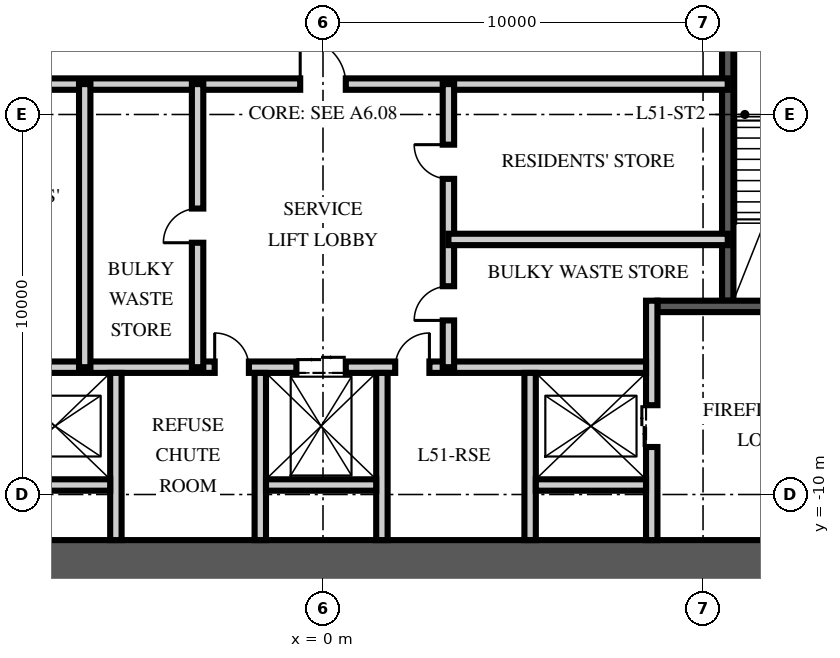
"""IFC4 building model, lengths in metres.
Left out: names, types, materials, properties, quantities, classifications, styles, units other than length and angle.
Written with IfcOpenShell. Run it as: python <this file> out.ifc"""

import sys

from ifc_helpers import new_model, si_unit, direction, frame, frame_2d, origin, place, context, subcontext, project, spatial, rectangle, extrude, element, fill, save


model = new_model("IFC4")
c1 = context("Model", 3, precision=1e-05, world=origin(), true_north=direction((0.0, 1.0)))
c2 = subcontext(c1, "Body", "Model", "MODEL_VIEW")
j1 = project(units=[si_unit("LENGTHUNIT", "METRE"), si_unit("PLANEANGLEUNIT", "RADIAN")], contexts=[c1])
p1 = place(None, origin())
s1 = spatial("IfcSite", under=j1, at=p1, CompositionType="ELEMENT")
p2 = place(p1, origin())
s2 = spatial("IfcBuilding", under=s1, at=p2, CompositionType="ELEMENT")
p3 = place(p2, frame((0.0, 0.0, 207.0)))
s3 = spatial("IfcBuildingStorey", under=s2, at=p3, CompositionType="ELEMENT", Elevation=207.0)
p4 = place(p3, frame((-15.5, -12.0, -0.25), z_axis=(0.0, 0.0, 1.0), x_axis=(1.0, 0.0, 0.0)))
e1 = element("IfcWall", 1, at=p4, inside=s3, PredefinedType="SHEAR", context=c2, shape_type="SweptSolid", body=[
    extrude(rectangle(XDim=31.0, YDim=1.6, at=frame_2d((15.5, 0.0))), origin(), (0.0, 0.0, 1.0), 3.75),
])
p5 = place(p3, frame((10.65, -4.9, 0.0), z_axis=(0.0, 0.0, 1.0), x_axis=(0.0, 1.0, 0.0)))
e2 = element("IfcWall", 2, at=p5, inside=s3, PredefinedType="SOLIDWALL", context=c2, shape_type="SweptSolid", body=[
    extrude(rectangle(XDim=10.1, YDim=0.3, at=frame_2d((5.05, 0.0))), origin(), (0.0, 0.0, 1.0), 3.5),
])
p6 = place(p3, frame((14.7, -5.05, 0.0), z_axis=(0.0, 0.0, 1.0), x_axis=(-1.0, 0.0, 0.0)))
e3 = element("IfcWall", 3, at=p6, inside=s3, PredefinedType="SOLIDWALL", context=c2, shape_type="SweptSolid", body=[
    extrude(rectangle(XDim=5.9, YDim=0.3, at=frame_2d((2.95, 0.0))), origin(), (0.0, 0.0, 1.0), 3.5),
])
p7 = place(p6, frame((1.35, 0.0, 0.0)))
e4 = element("IfcOpeningElement", 4, at=p7, cuts=e3, PredefinedType="OPENING", context=c2, shape_type="SweptSolid", body=[
    extrude(rectangle(XDim=1.2, YDim=2.1, at=frame_2d((0.6, 1.05))), frame((0.0, 0.16, 0.0), z_axis=(0.0, -1.0, 0.0), x_axis=(1.0, 0.0, 0.0)), (0.0, 0.0, 1.0), 0.32),
])
p8 = place(p3, frame((8.65, -11.2, 0.0), z_axis=(0.0, 0.0, 1.0), x_axis=(0.0, 1.0, 0.0)))
e5 = element("IfcWall", 5, at=p8, inside=s3, PredefinedType="PARTITIONING", context=c2, shape_type="SweptSolid", body=[
    extrude(rectangle(XDim=6.3, YDim=0.3, at=frame_2d((3.15, 0.0))), origin(), (0.0, 0.0, 1.0), 3.5),
])
p9 = place(p8, frame((2.45, 0.0, 0.0)))
e6 = element("IfcOpeningElement", 6, at=p9, cuts=e5, PredefinedType="OPENING", context=c2, shape_type="SweptSolid", body=[
    extrude(rectangle(XDim=1.1, YDim=2.1, at=frame_2d((0.55, 1.05))), frame((0.0, 0.16, 0.0), z_axis=(0.0, -1.0, 0.0), x_axis=(1.0, 0.0, 0.0)), (0.0, 0.0, 1.0), 0.32),
])
p10 = place(p3, frame((-8.5, -6.65, 0.0), z_axis=(0.0, 0.0, 1.0), x_axis=(1.0, 0.0, 0.0)))
e7 = element("IfcWall", 7, at=p10, inside=s3, PredefinedType="PARTITIONING", context=c2, shape_type="SweptSolid", body=[
    extrude(rectangle(XDim=17.0, YDim=0.3, at=frame_2d((8.5, 0.0))), origin(), (0.0, 0.0, 1.0), 3.5),
])
p11 = place(p10, frame((7.8, 0.0, 0.0)))
e8 = element("IfcOpeningElement", 8, at=p11, cuts=e7, PredefinedType="OPENING", context=c2, shape_type="SweptSolid", body=[
    extrude(rectangle(XDim=1.3, YDim=2.4, at=frame_2d((0.65, 1.2))), frame((0.0, 0.16, 0.0), z_axis=(0.0, -1.0, 0.0), x_axis=(1.0, 0.0, 0.0)), (0.0, 0.0, 1.0), 0.32),
])
p12 = place(p10, frame((5.65, 0.0, 0.0)))
e9 = element("IfcOpeningElement", 9, at=p12, cuts=e7, PredefinedType="OPENING", context=c2, shape_type="SweptSolid", body=[
    extrude(rectangle(XDim=0.9, YDim=2.1, at=frame_2d((0.45, 1.05))), frame((0.0, 0.16, 0.0), z_axis=(0.0, -1.0, 0.0), x_axis=(1.0, 0.0, 0.0)), (0.0, 0.0, 1.0), 0.32),
])
p13 = place(p10, frame((10.4, 0.0, 0.0)))
e10 = element("IfcOpeningElement", 10, at=p13, cuts=e7, PredefinedType="OPENING", context=c2, shape_type="SweptSolid", body=[
    extrude(rectangle(XDim=0.9, YDim=2.1, at=frame_2d((0.45, 1.05))), frame((0.0, 0.16, 0.0), z_axis=(0.0, -1.0, 0.0), x_axis=(1.0, 0.0, 0.0)), (0.0, 0.0, 1.0), 0.32),
])
for number, where, z_axis, x_axis in (
    (11, (-5.45, -11.2, 0.0), (0.0, 0.0, 1.0), (0.0, 1.0, 0.0)),
    (12, (-1.65, -11.2, 0.0), (0.0, 0.0, 1.0), (0.0, 1.0, 0.0)),
    (13, (1.55, -11.2, 0.0), (0.0, 0.0, 1.0), (0.0, 1.0, 0.0)),
    (14, (5.45, -11.2, 0.0), (0.0, 0.0, 1.0), (0.0, 1.0, 0.0)),
):
    element("IfcWall", number, at=place(p3, frame(where, z_axis=z_axis, x_axis=x_axis)), inside=s3, PredefinedType="PARTITIONING", context=c2, shape_type="SweptSolid", body=[
        extrude(rectangle(XDim=4.4, YDim=0.3, at=frame_2d((2.2, 0.0))), origin(), (0.0, 0.0, 1.0), 3.5),
    ])
for number, where, z_axis, x_axis in (
    (15, (-8.5, -9.75, 0.0), (0.0, 0.0, 1.0), (1.0, 0.0, 0.0)),
    (16, (-1.5, -9.75, 0.0), (0.0, 0.0, 1.0), (1.0, 0.0, 0.0)),
    (17, (5.6, -9.75, 0.0), (0.0, 0.0, 1.0), (1.0, 0.0, 0.0)),
):
    element("IfcWall", number, at=place(p3, frame(where, z_axis=z_axis, x_axis=x_axis)), inside=s3, PredefinedType="PARTITIONING", context=c2, shape_type="SweptSolid", body=[
        extrude(rectangle(XDim=2.9, YDim=0.3, at=frame_2d((1.45, 0.0))), origin(), (0.0, 0.0, 1.0), 3.5),
    ])
p14 = place(p3, frame((-10.65, 0.8, 0.0), z_axis=(0.0, 0.0, 1.0), x_axis=(1.0, 0.0, 0.0)))
e18 = element("IfcWall", 18, at=p14, inside=s3, PredefinedType="PARTITIONING", context=c2, shape_type="SweptSolid", body=[
    extrude(rectangle(XDim=21.3, YDim=0.3, at=frame_2d((10.65, 0.0))), origin(), (0.0, 0.0, 1.0), 3.5),
])
p15 = place(p14, frame((10.05, 0.0, 0.0)))
e19 = element("IfcOpeningElement", 19, at=p15, cuts=e18, PredefinedType="OPENING", context=c2, shape_type="SweptSolid", body=[
    extrude(rectangle(XDim=1.2, YDim=2.1, at=frame_2d((0.6, 1.05))), frame((0.0, 0.16, 0.0), z_axis=(0.0, -1.0, 0.0), x_axis=(1.0, 0.0, 0.0)), (0.0, 0.0, 1.0), 0.32),
])
p16 = place(p14, frame((1.74, 0.0, 0.0)))
e20 = element("IfcOpeningElement", 20, at=p16, cuts=e18, PredefinedType="OPENING", context=c2, shape_type="SweptSolid", body=[
    extrude(rectangle(XDim=0.9, YDim=2.1, at=frame_2d((0.45, 1.05))), frame((0.0, 0.16, 0.0), z_axis=(0.0, -1.0, 0.0), x_axis=(1.0, 0.0, 0.0)), (0.0, 0.0, 1.0), 0.32),
])
p17 = place(p3, frame((-3.3, -6.65, 0.0), z_axis=(0.0, 0.0, 1.0), x_axis=(0.0, 1.0, 0.0)))
e21 = element("IfcWall", 21, at=p17, inside=s3, PredefinedType="PARTITIONING", context=c2, shape_type="SweptSolid", body=[
    extrude(rectangle(XDim=7.45, YDim=0.3, at=frame_2d((3.725, 0.0))), origin(), (0.0, 0.0, 1.0), 3.5),
])
p18 = place(p17, frame((3.275, 0.0, 0.0)))
e22 = element("IfcOpeningElement", 22, at=p18, cuts=e21, PredefinedType="OPENING", context=c2, shape_type="SweptSolid", body=[
    extrude(rectangle(XDim=0.9, YDim=2.1, at=frame_2d((0.45, 1.05))), frame((0.0, 0.16, 0.0), z_axis=(0.0, -1.0, 0.0), x_axis=(1.0, 0.0, 0.0)), (0.0, 0.0, 1.0), 0.32),
])
p19 = place(p3, frame((3.3, -6.65, 0.0), z_axis=(0.0, 0.0, 1.0), x_axis=(0.0, 1.0, 0.0)))
e23 = element("IfcWall", 23, at=p19, inside=s3, PredefinedType="PARTITIONING", context=c2, shape_type="SweptSolid", body=[
    extrude(rectangle(XDim=7.45, YDim=0.3, at=frame_2d((3.725, 0.0))), origin(), (0.0, 0.0, 1.0), 3.5),
])
p20 = place(p19, frame((1.231, 0.0, 0.0)))
e24 = element("IfcOpeningElement", 24, at=p20, cuts=e23, PredefinedType="OPENING", context=c2, shape_type="SweptSolid", body=[
    extrude(rectangle(XDim=0.9, YDim=2.1, at=frame_2d((0.45, 1.05))), frame((0.0, 0.16, 0.0), z_axis=(0.0, -1.0, 0.0), x_axis=(1.0, 0.0, 0.0)), (0.0, 0.0, 1.0), 0.32),
])
p21 = place(p19, frame((4.956, 0.0, 0.0)))
e25 = element("IfcOpeningElement", 25, at=p21, cuts=e23, PredefinedType="OPENING", context=c2, shape_type="SweptSolid", body=[
    extrude(rectangle(XDim=0.9, YDim=2.1, at=frame_2d((0.45, 1.05))), frame((0.0, 0.16, 0.0), z_axis=(0.0, -1.0, 0.0), x_axis=(1.0, 0.0, 0.0)), (0.0, 0.0, 1.0), 0.32),
])
p22 = place(p3, frame((-6.27, -6.65, 0.0), z_axis=(0.0, 0.0, 1.0), x_axis=(0.0, 1.0, 0.0)))
e26 = element("IfcWall", 26, at=p22, inside=s3, PredefinedType="PARTITIONING", context=c2, shape_type="SweptSolid", body=[
    extrude(rectangle(XDim=7.45, YDim=0.3, at=frame_2d((3.725, 0.0))), origin(), (0.0, 0.0, 1.0), 3.5),
])
p23 = place(p3, frame((10.65, -3.288, 0.0), z_axis=(0.0, 0.0, 1.0), x_axis=(-1.0, 0.0, 0.0)))
e27 = element("IfcWall", 27, at=p23, inside=s3, PredefinedType="PARTITIONING", context=c2, shape_type="SweptSolid", body=[
    extrude(rectangle(XDim=7.35, YDim=0.3, at=frame_2d((3.675, 0.0))), origin(), (0.0, 0.0, 1.0), 3.5),
])
p24 = place(p9, origin())
e28 = element("IfcDoor", 28, at=p24, inside=s3, OperationType="DOUBLE_DOOR_SLIDING", PredefinedType="DOOR", context=c2, shape_type="SweptSolid", body=[
    extrude(rectangle(XDim=1.1, YDim=2.1, at=frame_2d((0.55, 1.05))), frame((0.0, 0.025, 0.0), z_axis=(0.0, -1.0, 0.0), x_axis=(1.0, 0.0, 0.0)), (0.0, 0.0, 1.0), 0.05),
])
fill(e6, e28)
p25 = place(p11, origin())
e29 = element("IfcDoor", 29, at=p25, inside=s3, OperationType="DOUBLE_DOOR_SLIDING", PredefinedType="DOOR", context=c2, shape_type="SweptSolid", body=[
    extrude(rectangle(XDim=1.3, YDim=2.4, at=frame_2d((0.65, 1.2))), frame((0.0, 0.025, 0.0), z_axis=(0.0, -1.0, 0.0), x_axis=(1.0, 0.0, 0.0)), (0.0, 0.0, 1.0), 0.05),
])
fill(e8, e29)
p26 = place(p15, origin())
e30 = element("IfcDoor", 30, at=p26, inside=s3, OperationType="SINGLE_SWING_LEFT", PredefinedType="DOOR", context=c2, shape_type="SweptSolid", body=[
    extrude(rectangle(XDim=1.2, YDim=2.1, at=frame_2d((0.6, 1.05))), frame((0.0, 0.025, 0.0), z_axis=(0.0, -1.0, 0.0), x_axis=(1.0, 0.0, 0.0)), (0.0, 0.0, 1.0), 0.05),
])
fill(e19, e30)
p27 = place(p12, origin())
e31 = element("IfcDoor", 31, at=p27, inside=s3, OperationType="SINGLE_SWING_LEFT", PredefinedType="DOOR", context=c2, shape_type="SweptSolid", body=[
    extrude(rectangle(XDim=0.9, YDim=2.1, at=frame_2d((0.45, 1.05))), frame((0.0, 0.025, 0.0), z_axis=(0.0, -1.0, 0.0), x_axis=(1.0, 0.0, 0.0)), (0.0, 0.0, 1.0), 0.05),
])
fill(e9, e31)
p28 = place(p13, origin())
e32 = element("IfcDoor", 32, at=p28, inside=s3, OperationType="SINGLE_SWING_RIGHT", PredefinedType="DOOR", context=c2, shape_type="SweptSolid", body=[
    extrude(rectangle(XDim=0.9, YDim=2.1, at=frame_2d((0.45, 1.05))), frame((0.0, 0.025, 0.0), z_axis=(0.0, -1.0, 0.0), x_axis=(1.0, 0.0, 0.0)), (0.0, 0.0, 1.0), 0.05),
])
fill(e10, e32)
p29 = place(p18, origin())
e33 = element("IfcDoor", 33, at=p29, inside=s3, OperationType="SINGLE_SWING_LEFT", PredefinedType="DOOR", context=c2, shape_type="SweptSolid", body=[
    extrude(rectangle(XDim=0.9, YDim=2.1, at=frame_2d((0.45, 1.05))), frame((0.0, 0.025, 0.0), z_axis=(0.0, -1.0, 0.0), x_axis=(1.0, 0.0, 0.0)), (0.0, 0.0, 1.0), 0.05),
])
fill(e22, e33)
p30 = place(p20, origin())
e34 = element("IfcDoor", 34, at=p30, inside=s3, OperationType="SINGLE_SWING_LEFT", PredefinedType="DOOR", context=c2, shape_type="SweptSolid", body=[
    extrude(rectangle(XDim=0.9, YDim=2.1, at=frame_2d((0.45, 1.05))), frame((0.0, 0.025, 0.0), z_axis=(0.0, -1.0, 0.0), x_axis=(1.0, 0.0, 0.0)), (0.0, 0.0, 1.0), 0.05),
])
fill(e24, e34)
p31 = place(p21, origin())
e35 = element("IfcDoor", 35, at=p31, inside=s3, OperationType="SINGLE_SWING_RIGHT", PredefinedType="DOOR", context=c2, shape_type="SweptSolid", body=[
    extrude(rectangle(XDim=0.9, YDim=2.1, at=frame_2d((0.45, 1.05))), frame((0.0, 0.025, 0.0), z_axis=(0.0, -1.0, 0.0), x_axis=(1.0, 0.0, 0.0)), (0.0, 0.0, 1.0), 0.05),
])
fill(e25, e35)
save(model, sys.argv[1])
